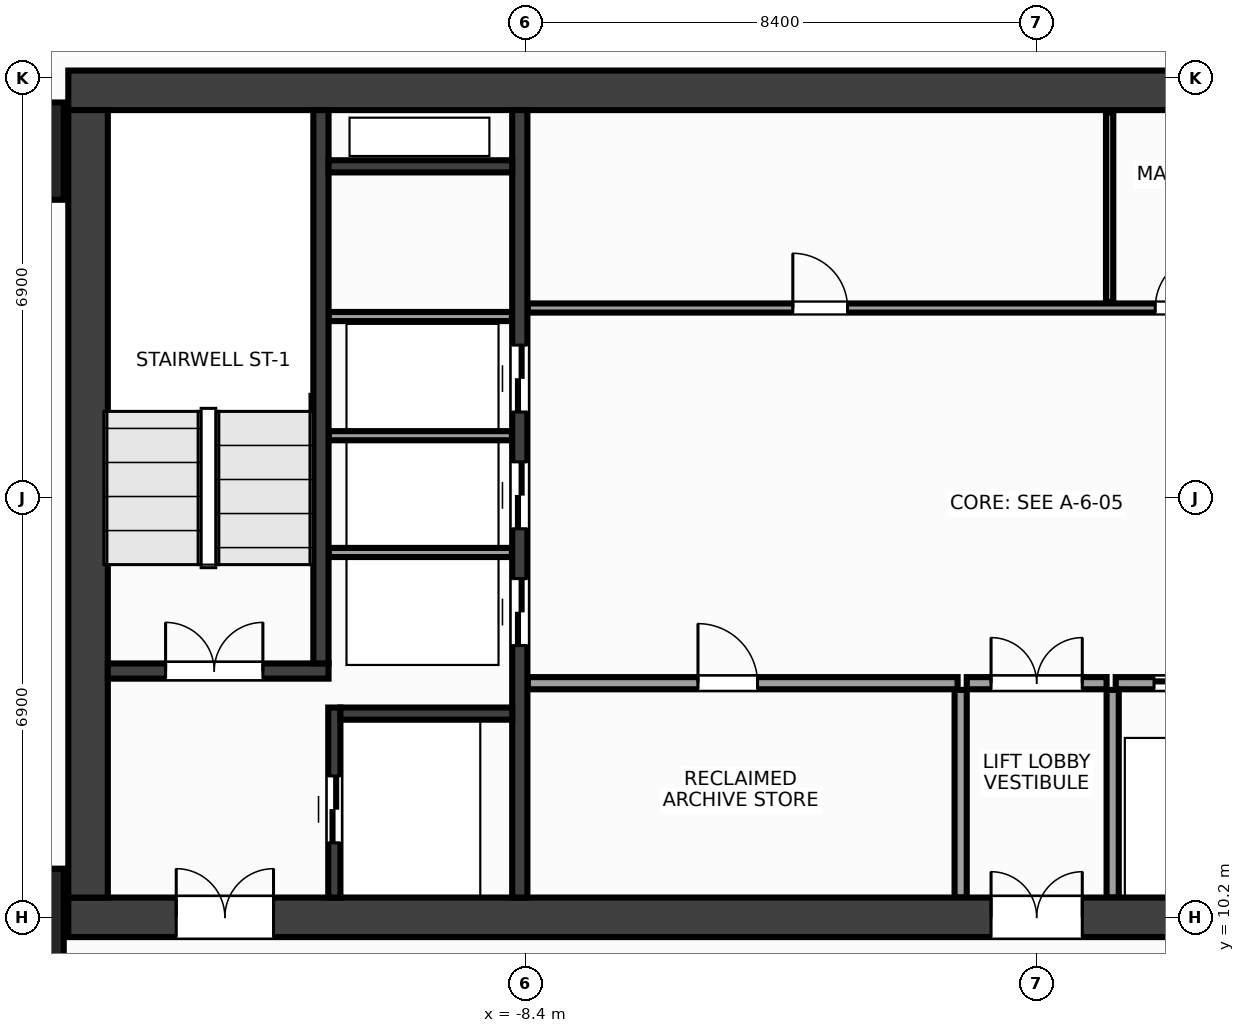
"""IFC4 building model, lengths in metres.
Left out: names, types, materials, properties, quantities, classifications, styles, units other than length and angle.
Written with IfcOpenShell. Run it as: python <this file> out.ifc"""

import sys

from ifc_helpers import new_model, si_unit, direction, frame, frame_2d, origin, origin_2d, place, context, subcontext, project, spatial, rectangle, extrude, source, transform, mapped, element, fill, save


model = new_model("IFC4")
c1 = context("Model", 3, precision=1e-05, world=origin(), true_north=direction((0.0, 1.0)))
c2 = subcontext(c1, "Body", "Model", "MODEL_VIEW")
j1 = project(units=[si_unit("LENGTHUNIT", "METRE"), si_unit("PLANEANGLEUNIT", "RADIAN")], contexts=[c1])
p1 = place(None, origin())
s1 = spatial("IfcSite", under=j1, at=p1, CompositionType="ELEMENT")
p2 = place(p1, origin())
s2 = spatial("IfcBuilding", under=s1, at=p2, CompositionType="ELEMENT")
p3 = place(p2, frame((0.0, 0.0, 167.6)))
s3 = spatial("IfcBuildingStorey", under=s2, at=p3, CompositionType="ELEMENT", Elevation=167.6)
m1 = source(origin(), c2, "Body", "SweptSolid", [
    extrude(rectangle(XDim=31.85, YDim=0.65, at=frame_2d((15.925, 0.0))), origin(), (0.0, 0.0, 1.0), 3.6),
])
p4 = place(p3, frame((-15.925, 23.8, 0.0), z_axis=(0.0, 0.0, 1.0), x_axis=(1.0, 0.0, 0.0)))
e1 = element("IfcWall", 1, at=p4, inside=s3, PredefinedType="SHEAR", context=c2, shape_type="MappedRepresentation", body=[
    mapped(m1, transform((0.0, 0.0, 0.0), x_axis=(1.0, 0.0, 0.0), y_axis=(0.0, 1.0, 0.0), z_axis=(0.0, 0.0, 1.0), scale=1.0)),
])
p5 = place(p3, frame((-15.925, 10.2, 0.0), z_axis=(0.0, 0.0, 1.0), x_axis=(1.0, 0.0, 0.0)))
e2 = element("IfcWall", 2, at=p5, inside=s3, PredefinedType="SHEAR", context=c2, shape_type="MappedRepresentation", body=[
    mapped(m1, transform((0.0, 0.0, 0.0), x_axis=(1.0, 0.0, 0.0), y_axis=(0.0, 1.0, 0.0), z_axis=(0.0, 0.0, 1.0), scale=1.0)),
])
p6 = place(p5, frame((1.775, 0.0, 0.0)))
e3 = element("IfcOpeningElement", 3, at=p6, cuts=e2, PredefinedType="OPENING", context=c2, shape_type="SweptSolid", body=[
    extrude(rectangle(XDim=1.6, YDim=2.15, at=frame_2d((0.8, 1.075))), frame((0.0, 0.337, 0.0), z_axis=(0.0, -1.0, 0.0), x_axis=(1.0, 0.0, 0.0)), (0.0, 0.0, 1.0), 0.674),
])
p7 = place(p5, frame((28.475, 0.0, 0.0)))
e4 = element("IfcOpeningElement", 4, at=p7, cuts=e2, PredefinedType="OPENING", context=c2, shape_type="SweptSolid", body=[
    extrude(rectangle(XDim=1.6, YDim=2.15, at=frame_2d((0.8, 1.075))), frame((0.0, 0.337, 0.0), z_axis=(0.0, -1.0, 0.0), x_axis=(1.0, 0.0, 0.0)), (0.0, 0.0, 1.0), 0.674),
])
p8 = place(p5, frame((15.175, 0.0, 0.0)))
e5 = element("IfcOpeningElement", 5, at=p8, cuts=e2, PredefinedType="OPENING", context=c2, shape_type="SweptSolid", body=[
    extrude(rectangle(XDim=1.5, YDim=2.2, at=frame_2d((0.75, 1.1))), frame((0.0, 0.337, 0.0), z_axis=(0.0, -1.0, 0.0), x_axis=(1.0, 0.0, 0.0)), (0.0, 0.0, 1.0), 0.674),
])
m2 = source(origin(), c2, "Body", "SweptSolid", [
    extrude(rectangle(XDim=12.95, YDim=0.65, at=frame_2d((6.475, 0.0))), origin(), (0.0, 0.0, 1.0), 3.6),
])
p9 = place(p3, frame((-15.6, 10.525, 0.0), z_axis=(0.0, 0.0, 1.0), x_axis=(0.0, 1.0, 0.0)))
e6 = element("IfcWall", 6, at=p9, inside=s3, PredefinedType="SHEAR", context=c2, shape_type="MappedRepresentation", body=[
    mapped(m2, transform((0.0, 0.0, 0.0), x_axis=(1.0, 0.0, 0.0), y_axis=(0.0, 1.0, 0.0), z_axis=(0.0, 0.0, 1.0), scale=1.0)),
])
m3 = source(origin(), c2, "Body", "SweptSolid", [
    extrude(rectangle(XDim=12.95, YDim=0.25, at=frame_2d((6.475, 0.0))), origin(), (0.0, 0.0, 1.0), 3.6),
])
p10 = place(p3, frame((-8.5, 10.525, 0.0), z_axis=(0.0, 0.0, 1.0), x_axis=(0.0, 1.0, 0.0)))
e7 = element("IfcWall", 7, at=p10, inside=s3, PredefinedType="SHEAR", context=c2, shape_type="MappedRepresentation", body=[
    mapped(m3, transform((0.0, 0.0, 0.0), x_axis=(1.0, 0.0, 0.0), y_axis=(0.0, 1.0, 0.0), z_axis=(0.0, 0.0, 1.0), scale=1.0)),
])
p11 = place(p10, frame((4.145, 0.0, 0.0)))
e8 = element("IfcOpeningElement", 8, at=p11, cuts=e7, PredefinedType="OPENING", context=c2, shape_type="SweptSolid", body=[
    extrude(rectangle(XDim=1.1, YDim=2.15, at=frame_2d((0.55, 1.075))), frame((0.0, 0.137, 0.0), z_axis=(0.0, -1.0, 0.0), x_axis=(1.0, 0.0, 0.0)), (0.0, 0.0, 1.0), 0.274),
])
p12 = place(p10, frame((6.065, 0.0, 0.0)))
e9 = element("IfcOpeningElement", 9, at=p12, cuts=e7, PredefinedType="OPENING", context=c2, shape_type="SweptSolid", body=[
    extrude(rectangle(XDim=1.1, YDim=2.15, at=frame_2d((0.55, 1.075))), frame((0.0, 0.137, 0.0), z_axis=(0.0, -1.0, 0.0), x_axis=(1.0, 0.0, 0.0)), (0.0, 0.0, 1.0), 0.274),
])
p13 = place(p10, frame((7.985, 0.0, 0.0)))
e10 = element("IfcOpeningElement", 10, at=p13, cuts=e7, PredefinedType="OPENING", context=c2, shape_type="SweptSolid", body=[
    extrude(rectangle(XDim=1.1, YDim=2.15, at=frame_2d((0.55, 1.075))), frame((0.0, 0.137, 0.0), z_axis=(0.0, -1.0, 0.0), x_axis=(1.0, 0.0, 0.0)), (0.0, 0.0, 1.0), 0.274),
])
m4 = source(origin(), c2, "Body", "SweptSolid", [
    extrude(rectangle(XDim=3.63, YDim=0.25, at=frame_2d((1.815, 0.0))), origin(), (0.0, 0.0, 1.0), 3.6),
])
p14 = place(p3, frame((-15.275, 14.25, 0.0), z_axis=(0.0, 0.0, 1.0), x_axis=(1.0, 0.0, 0.0)))
e11 = element("IfcWall", 11, at=p14, inside=s3, PredefinedType="SHEAR", context=c2, shape_type="MappedRepresentation", body=[
    mapped(m4, transform((0.0, 0.0, 0.0), x_axis=(1.0, 0.0, 0.0), y_axis=(0.0, 1.0, 0.0), z_axis=(0.0, 0.0, 1.0), scale=1.0)),
])
p15 = place(p14, frame((0.95, 0.0, 0.0)))
e12 = element("IfcOpeningElement", 12, at=p15, cuts=e11, PredefinedType="OPENING", context=c2, shape_type="SweptSolid", body=[
    extrude(rectangle(XDim=1.6, YDim=2.15, at=frame_2d((0.8, 1.075))), frame((0.0, 0.137, 0.0), z_axis=(0.0, -1.0, 0.0), x_axis=(1.0, 0.0, 0.0)), (0.0, 0.0, 1.0), 0.274),
])
m5 = source(origin(), c2, "Body", "SweptSolid", [
    extrude(rectangle(XDim=9.1, YDim=0.25, at=frame_2d((4.55, 0.0))), origin(), (0.0, 0.0, 1.0), 3.6),
])
p16 = place(p3, frame((-11.77, 14.375, 0.0), z_axis=(0.0, 0.0, 1.0), x_axis=(0.0, 1.0, 0.0)))
e13 = element("IfcWall", 13, at=p16, inside=s3, PredefinedType="SHEAR", context=c2, shape_type="MappedRepresentation", body=[
    mapped(m5, transform((0.0, 0.0, 0.0), x_axis=(1.0, 0.0, 0.0), y_axis=(0.0, 1.0, 0.0), z_axis=(0.0, 0.0, 1.0), scale=1.0)),
])
m6 = source(origin(), c2, "Body", "SweptSolid", [
    extrude(rectangle(XDim=3.125, YDim=0.2, at=frame_2d((1.562, 0.0))), origin(), (0.0, 0.0, 1.0), 3.6),
])
p17 = place(p3, frame((-11.55, 10.525, 0.0), z_axis=(0.0, 0.0, 1.0), x_axis=(0.0, 1.0, 0.0)))
e14 = element("IfcWall", 14, at=p17, inside=s3, PredefinedType="SHEAR", context=c2, shape_type="MappedRepresentation", body=[
    mapped(m6, transform((0.0, 0.0, 0.0), x_axis=(1.0, 0.0, 0.0), y_axis=(0.0, 1.0, 0.0), z_axis=(0.0, 0.0, 1.0), scale=1.0)),
])
p18 = place(p17, frame((0.9, 0.0, 0.0)))
e15 = element("IfcOpeningElement", 15, at=p18, cuts=e14, PredefinedType="OPENING", context=c2, shape_type="SweptSolid", body=[
    extrude(rectangle(XDim=1.1, YDim=2.15, at=frame_2d((0.55, 1.075))), frame((0.0, 0.112, 0.0), z_axis=(0.0, -1.0, 0.0), x_axis=(1.0, 0.0, 0.0)), (0.0, 0.0, 1.0), 0.224),
])
m7 = source(origin(), c2, "Body", "SweptSolid", [
    extrude(rectangle(XDim=2.825, YDim=0.2, at=frame_2d((1.413, 0.0))), origin(), (0.0, 0.0, 1.0), 3.6),
])
p19 = place(p3, frame((-11.45, 13.55, 0.0), z_axis=(0.0, 0.0, 1.0), x_axis=(1.0, 0.0, 0.0)))
e16 = element("IfcWall", 16, at=p19, inside=s3, PredefinedType="SHEAR", context=c2, shape_type="MappedRepresentation", body=[
    mapped(m7, transform((0.0, 0.0, 0.0), x_axis=(1.0, 0.0, 0.0), y_axis=(0.0, 1.0, 0.0), z_axis=(0.0, 0.0, 1.0), scale=1.0)),
])
m8 = source(origin(), c2, "Body", "SweptSolid", [
    extrude(rectangle(XDim=3.02, YDim=0.2, at=frame_2d((1.51, 0.0))), origin(), (0.0, 0.0, 1.0), 3.6),
])
p20 = place(p3, frame((-11.645, 22.55, 0.0), z_axis=(0.0, 0.0, 1.0), x_axis=(1.0, 0.0, 0.0)))
e17 = element("IfcWall", 17, at=p20, inside=s3, PredefinedType="SHEAR", context=c2, shape_type="MappedRepresentation", body=[
    mapped(m8, transform((0.0, 0.0, 0.0), x_axis=(1.0, 0.0, 0.0), y_axis=(0.0, 1.0, 0.0), z_axis=(0.0, 0.0, 1.0), scale=1.0)),
])
m9 = source(origin(), c2, "Body", "SweptSolid", [
    extrude(rectangle(XDim=1.6, YDim=1.6, at=origin_2d()), origin(), (0.0, 0.0, 1.0), 3.6),
])
for number, where, z_axis, x_axis in (
    (18, (-16.8, 10.2, 0.0), (0.0, 0.0, 1.0), (1.0, 0.0, 0.0)),
    (19, (-16.8, 22.8, 0.0), (0.0, 0.0, 1.0), (1.0, 0.0, 0.0)),
):
    element("IfcColumn", number, at=place(p3, frame(where, z_axis=z_axis, x_axis=x_axis)), inside=s3, PredefinedType="COLUMN", context=c2, shape_type="MappedRepresentation", body=[
        mapped(m9, transform((0.0, 0.0, 0.0), x_axis=(1.0, 0.0, 0.0), y_axis=(0.0, 1.0, 0.0), z_axis=(0.0, 0.0, 1.0), scale=1.0)),
    ])
m10 = source(origin(), c2, "Body", "SweptSolid", [
    extrude(rectangle(XDim=3.01, YDim=0.15, at=frame_2d((1.505, 0.0))), origin(), (0.0, 0.0, 1.0), 3.38),
])
for number, where, z_axis, x_axis in (
    (20, (-11.64, 16.2, 0.0), (0.0, 0.0, 1.0), (1.0, 0.0, 0.0)),
    (21, (-11.64, 18.12, 0.0), (0.0, 0.0, 1.0), (1.0, 0.0, 0.0)),
    (22, (-11.64, 20.08, 0.0), (0.0, 0.0, 1.0), (1.0, 0.0, 0.0)),
):
    element("IfcWall", number, at=place(p3, frame(where, z_axis=z_axis, x_axis=x_axis)), inside=s3, PredefinedType="PARTITIONING", context=c2, shape_type="MappedRepresentation", body=[
        mapped(m10, transform((0.0, 0.0, 0.0), x_axis=(1.0, 0.0, 0.0), y_axis=(0.0, 1.0, 0.0), z_axis=(0.0, 0.0, 1.0), scale=1.0)),
    ])
m11 = source(origin(), c2, "Body", "SweptSolid", [
    extrude(rectangle(XDim=7.07, YDim=0.2, at=frame_2d((3.535, 0.0))), origin(), (0.0, 0.0, 1.0), 3.38),
])
p21 = place(p3, frame((-8.37, 14.05, 0.0), z_axis=(0.0, 0.0, 1.0), x_axis=(1.0, 0.0, 0.0)))
e23 = element("IfcWall", 23, at=p21, inside=s3, PredefinedType="PARTITIONING", context=c2, shape_type="MappedRepresentation", body=[
    mapped(m11, transform((0.0, 0.0, 0.0), x_axis=(1.0, 0.0, 0.0), y_axis=(0.0, 1.0, 0.0), z_axis=(0.0, 0.0, 1.0), scale=1.0)),
])
p22 = place(p21, frame((2.8, 0.0, 0.0)))
e24 = element("IfcOpeningElement", 24, at=p22, cuts=e23, PredefinedType="OPENING", context=c2, shape_type="SweptSolid", body=[
    extrude(rectangle(XDim=0.98, YDim=2.15, at=frame_2d((0.49, 1.075))), frame((0.0, 0.112, 0.0), z_axis=(0.0, -1.0, 0.0), x_axis=(1.0, 0.0, 0.0)), (0.0, 0.0, 1.0), 0.224),
])
p23 = place(p3, frame((1.3, 14.05, 0.0), z_axis=(0.0, 0.0, 1.0), x_axis=(1.0, 0.0, 0.0)))
e25 = element("IfcWall", 25, at=p23, inside=s3, PredefinedType="PARTITIONING", context=c2, shape_type="MappedRepresentation", body=[
    mapped(m11, transform((0.0, 0.0, 0.0), x_axis=(1.0, 0.0, 0.0), y_axis=(0.0, 1.0, 0.0), z_axis=(0.0, 0.0, 1.0), scale=1.0)),
])
p24 = place(p23, frame((0.63, 0.0, 0.0)))
e26 = element("IfcOpeningElement", 26, at=p24, cuts=e25, PredefinedType="OPENING", context=c2, shape_type="SweptSolid", body=[
    extrude(rectangle(XDim=1.1, YDim=2.15, at=frame_2d((0.55, 1.075))), frame((0.0, 0.112, 0.0), z_axis=(0.0, -1.0, 0.0), x_axis=(1.0, 0.0, 0.0)), (0.0, 0.0, 1.0), 0.224),
])
p25 = place(p23, frame((2.98, 0.0, 0.0)))
e27 = element("IfcOpeningElement", 27, at=p25, cuts=e25, PredefinedType="OPENING", context=c2, shape_type="SweptSolid", body=[
    extrude(rectangle(XDim=1.1, YDim=2.15, at=frame_2d((0.55, 1.075))), frame((0.0, 0.112, 0.0), z_axis=(0.0, -1.0, 0.0), x_axis=(1.0, 0.0, 0.0)), (0.0, 0.0, 1.0), 0.224),
])
p26 = place(p23, frame((5.33, 0.0, 0.0)))
e28 = element("IfcOpeningElement", 28, at=p26, cuts=e25, PredefinedType="OPENING", context=c2, shape_type="SweptSolid", body=[
    extrude(rectangle(XDim=1.1, YDim=2.15, at=frame_2d((0.55, 1.075))), frame((0.0, 0.112, 0.0), z_axis=(0.0, -1.0, 0.0), x_axis=(1.0, 0.0, 0.0)), (0.0, 0.0, 1.0), 0.224),
])
m12 = source(origin(), c2, "Body", "SweptSolid", [
    extrude(rectangle(XDim=3.415, YDim=0.2, at=frame_2d((1.708, 0.0))), origin(), (0.0, 0.0, 1.0), 3.38),
])
for number, where, z_axis, x_axis in (
    (29, (-1.25, 10.525, 0.0), (0.0, 0.0, 1.0), (0.0, 1.0, 0.0)),
    (30, (1.25, 10.525, 0.0), (0.0, 0.0, 1.0), (0.0, 1.0, 0.0)),
):
    element("IfcWall", number, at=place(p3, frame(where, z_axis=z_axis, x_axis=x_axis)), inside=s3, PredefinedType="PARTITIONING", context=c2, shape_type="MappedRepresentation", body=[
        mapped(m12, transform((0.0, 0.0, 0.0), x_axis=(1.0, 0.0, 0.0), y_axis=(0.0, 1.0, 0.0), z_axis=(0.0, 0.0, 1.0), scale=1.0)),
    ])
m13 = source(origin(), c2, "Body", "SweptSolid", [
    extrude(rectangle(XDim=2.3, YDim=0.2, at=frame_2d((1.15, 0.0))), origin(), (0.0, 0.0, 1.0), 3.38),
])
p27 = place(p3, frame((-1.15, 14.05, 0.0), z_axis=(0.0, 0.0, 1.0), x_axis=(1.0, 0.0, 0.0)))
e31 = element("IfcWall", 31, at=p27, inside=s3, PredefinedType="PARTITIONING", context=c2, shape_type="MappedRepresentation", body=[
    mapped(m13, transform((0.0, 0.0, 0.0), x_axis=(1.0, 0.0, 0.0), y_axis=(0.0, 1.0, 0.0), z_axis=(0.0, 0.0, 1.0), scale=1.0)),
])
p28 = place(p27, frame((0.4, 0.0, 0.0)))
e32 = element("IfcOpeningElement", 32, at=p28, cuts=e31, PredefinedType="OPENING", context=c2, shape_type="SweptSolid", body=[
    extrude(rectangle(XDim=1.5, YDim=2.2, at=frame_2d((0.75, 1.1))), frame((0.0, 0.112, 0.0), z_axis=(0.0, -1.0, 0.0), x_axis=(1.0, 0.0, 0.0)), (0.0, 0.0, 1.0), 0.224),
])
m14 = source(origin(), c2, "Body", "SweptSolid", [
    extrude(rectangle(XDim=14.59, YDim=0.15, at=frame_2d((7.295, 0.0))), origin(), (0.0, 0.0, 1.0), 3.38),
])
p29 = place(p3, frame((-8.37, 20.22, 0.0), z_axis=(0.0, 0.0, 1.0), x_axis=(1.0, 0.0, 0.0)))
e33 = element("IfcWall", 33, at=p29, inside=s3, PredefinedType="PARTITIONING", context=c2, shape_type="MappedRepresentation", body=[
    mapped(m14, transform((0.0, 0.0, 0.0), x_axis=(1.0, 0.0, 0.0), y_axis=(0.0, 1.0, 0.0), z_axis=(0.0, 0.0, 1.0), scale=1.0)),
])
p30 = place(p29, frame((4.36, 0.0, 0.0)))
e34 = element("IfcOpeningElement", 34, at=p30, cuts=e33, PredefinedType="OPENING", context=c2, shape_type="SweptSolid", body=[
    extrude(rectangle(XDim=0.9, YDim=2.15, at=frame_2d((0.45, 1.075))), frame((0.0, 0.087, 0.0), z_axis=(0.0, -1.0, 0.0), x_axis=(1.0, 0.0, 0.0)), (0.0, 0.0, 1.0), 0.174),
])
p31 = place(p29, frame((10.32, 0.0, 0.0)))
e35 = element("IfcOpeningElement", 35, at=p31, cuts=e33, PredefinedType="OPENING", context=c2, shape_type="SweptSolid", body=[
    extrude(rectangle(XDim=0.9, YDim=2.15, at=frame_2d((0.45, 1.075))), frame((0.0, 0.087, 0.0), z_axis=(0.0, -1.0, 0.0), x_axis=(1.0, 0.0, 0.0)), (0.0, 0.0, 1.0), 0.174),
])
p32 = place(p29, frame((12.77, 0.0, 0.0)))
e36 = element("IfcOpeningElement", 36, at=p32, cuts=e33, PredefinedType="OPENING", context=c2, shape_type="SweptSolid", body=[
    extrude(rectangle(XDim=0.9, YDim=2.15, at=frame_2d((0.45, 1.075))), frame((0.0, 0.087, 0.0), z_axis=(0.0, -1.0, 0.0), x_axis=(1.0, 0.0, 0.0)), (0.0, 0.0, 1.0), 0.174),
])
m15 = source(origin(), c2, "Body", "SweptSolid", [
    extrude(rectangle(XDim=3.115, YDim=0.12, at=frame_2d((1.558, 0.0))), origin(), (0.0, 0.0, 1.0), 3.38),
])
p33 = place(p3, frame((1.2, 20.32, 0.0), z_axis=(0.0, 0.0, 1.0), x_axis=(0.0, 1.0, 0.0)))
e37 = element("IfcWall", 37, at=p33, inside=s3, PredefinedType="PARTITIONING", context=c2, shape_type="MappedRepresentation", body=[
    mapped(m15, transform((0.0, 0.0, 0.0), x_axis=(1.0, 0.0, 0.0), y_axis=(0.0, 1.0, 0.0), z_axis=(0.0, 0.0, 1.0), scale=1.0)),
])
m16 = source(origin(), c2, "Body", "SweptSolid", [
    extrude(rectangle(XDim=1.6, YDim=2.15, at=frame_2d((0.8, 1.075))), frame((0.0, 0.025, 0.0), z_axis=(0.0, -1.0, 0.0), x_axis=(1.0, 0.0, 0.0)), (0.0, 0.0, 1.0), 0.05),
])
p34 = place(p15, origin())
e38 = element("IfcDoor", 38, at=p34, inside=s3, OperationType="DOUBLE_DOOR_SINGLE_SWING", PredefinedType="DOOR", context=c2, shape_type="MappedRepresentation", body=[
    mapped(m16, transform((0.0, 0.0, 0.0), x_axis=(1.0, 0.0, 0.0), y_axis=(0.0, 1.0, 0.0), z_axis=(0.0, 0.0, 1.0), scale=1.0)),
])
fill(e12, e38)
p35 = place(p6, origin())
e39 = element("IfcDoor", 39, at=p35, inside=s3, OperationType="DOUBLE_DOOR_SINGLE_SWING", PredefinedType="DOOR", context=c2, shape_type="MappedRepresentation", body=[
    mapped(m16, transform((0.0, 0.0, 0.0), x_axis=(1.0, 0.0, 0.0), y_axis=(0.0, 1.0, 0.0), z_axis=(0.0, 0.0, 1.0), scale=1.0)),
])
fill(e3, e39)
m17 = source(origin(), c2, "Body", "SweptSolid", [
    extrude(rectangle(XDim=1.1, YDim=2.15, at=frame_2d((0.55, 1.075))), frame((0.0, 0.025, 0.0), z_axis=(0.0, -1.0, 0.0), x_axis=(1.0, 0.0, 0.0)), (0.0, 0.0, 1.0), 0.05),
])
p36 = place(p18, origin())
e40 = element("IfcDoor", 40, at=p36, inside=s3, OperationType="DOUBLE_DOOR_SLIDING", PredefinedType="DOOR", context=c2, shape_type="MappedRepresentation", body=[
    mapped(m17, transform((0.0, 0.0, 0.0), x_axis=(1.0, 0.0, 0.0), y_axis=(0.0, 1.0, 0.0), z_axis=(0.0, 0.0, 1.0), scale=1.0)),
])
fill(e15, e40)
p37 = place(p11, origin())
e41 = element("IfcDoor", 41, at=p37, inside=s3, OperationType="DOUBLE_DOOR_SLIDING", PredefinedType="DOOR", context=c2, shape_type="MappedRepresentation", body=[
    mapped(m17, transform((0.0, 0.0, 0.0), x_axis=(1.0, 0.0, 0.0), y_axis=(0.0, 1.0, 0.0), z_axis=(0.0, 0.0, 1.0), scale=1.0)),
])
fill(e8, e41)
p38 = place(p12, origin())
e42 = element("IfcDoor", 42, at=p38, inside=s3, OperationType="DOUBLE_DOOR_SLIDING", PredefinedType="DOOR", context=c2, shape_type="MappedRepresentation", body=[
    mapped(m17, transform((0.0, 0.0, 0.0), x_axis=(1.0, 0.0, 0.0), y_axis=(0.0, 1.0, 0.0), z_axis=(0.0, 0.0, 1.0), scale=1.0)),
])
fill(e9, e42)
p39 = place(p13, origin())
e43 = element("IfcDoor", 43, at=p39, inside=s3, OperationType="DOUBLE_DOOR_SLIDING", PredefinedType="DOOR", context=c2, shape_type="MappedRepresentation", body=[
    mapped(m17, transform((0.0, 0.0, 0.0), x_axis=(1.0, 0.0, 0.0), y_axis=(0.0, 1.0, 0.0), z_axis=(0.0, 0.0, 1.0), scale=1.0)),
])
fill(e10, e43)
m18 = source(origin(), c2, "Body", "SweptSolid", [
    extrude(rectangle(XDim=0.98, YDim=2.15, at=frame_2d((0.49, 1.075))), frame((0.0, 0.025, 0.0), z_axis=(0.0, -1.0, 0.0), x_axis=(1.0, 0.0, 0.0)), (0.0, 0.0, 1.0), 0.05),
])
p40 = place(p22, origin())
e44 = element("IfcDoor", 44, at=p40, inside=s3, OperationType="SINGLE_SWING_LEFT", PredefinedType="DOOR", context=c2, shape_type="MappedRepresentation", body=[
    mapped(m18, transform((0.0, 0.0, 0.0), x_axis=(1.0, 0.0, 0.0), y_axis=(0.0, 1.0, 0.0), z_axis=(0.0, 0.0, 1.0), scale=1.0)),
])
fill(e24, e44)
p41 = place(p24, origin())
e45 = element("IfcDoor", 45, at=p41, inside=s3, OperationType="DOUBLE_DOOR_SLIDING", PredefinedType="DOOR", context=c2, shape_type="MappedRepresentation", body=[
    mapped(m17, transform((0.0, 0.0, 0.0), x_axis=(1.0, 0.0, 0.0), y_axis=(0.0, 1.0, 0.0), z_axis=(0.0, 0.0, 1.0), scale=1.0)),
])
fill(e26, e45)
m19 = source(origin(), c2, "Body", "SweptSolid", [
    extrude(rectangle(XDim=1.5, YDim=2.2, at=frame_2d((0.75, 1.1))), frame((0.0, 0.025, 0.0), z_axis=(0.0, -1.0, 0.0), x_axis=(1.0, 0.0, 0.0)), (0.0, 0.0, 1.0), 0.05),
])
p42 = place(p28, origin())
e46 = element("IfcDoor", 46, at=p42, inside=s3, OperationType="DOUBLE_DOOR_SINGLE_SWING", PredefinedType="DOOR", context=c2, shape_type="MappedRepresentation", body=[
    mapped(m19, transform((0.0, 0.0, 0.0), x_axis=(1.0, 0.0, 0.0), y_axis=(0.0, 1.0, 0.0), z_axis=(0.0, 0.0, 1.0), scale=1.0)),
])
fill(e32, e46)
p43 = place(p8, origin())
e47 = element("IfcDoor", 47, at=p43, inside=s3, OperationType="DOUBLE_DOOR_SINGLE_SWING", PredefinedType="DOOR", context=c2, shape_type="MappedRepresentation", body=[
    mapped(m19, transform((0.0, 0.0, 0.0), x_axis=(1.0, 0.0, 0.0), y_axis=(0.0, 1.0, 0.0), z_axis=(0.0, 0.0, 1.0), scale=1.0)),
])
fill(e5, e47)
m20 = source(origin(), c2, "Body", "SweptSolid", [
    extrude(rectangle(XDim=0.9, YDim=2.15, at=frame_2d((0.45, 1.075))), frame((0.0, 0.025, 0.0), z_axis=(0.0, -1.0, 0.0), x_axis=(1.0, 0.0, 0.0)), (0.0, 0.0, 1.0), 0.05),
])
p44 = place(p30, origin())
e48 = element("IfcDoor", 48, at=p44, inside=s3, OperationType="SINGLE_SWING_LEFT", PredefinedType="DOOR", context=c2, shape_type="MappedRepresentation", body=[
    mapped(m20, transform((0.0, 0.0, 0.0), x_axis=(1.0, 0.0, 0.0), y_axis=(0.0, 1.0, 0.0), z_axis=(0.0, 0.0, 1.0), scale=1.0)),
])
fill(e34, e48)
p45 = place(p31, origin())
e49 = element("IfcDoor", 49, at=p45, inside=s3, OperationType="SINGLE_SWING_RIGHT", PredefinedType="DOOR", context=c2, shape_type="MappedRepresentation", body=[
    mapped(m20, transform((0.0, 0.0, 0.0), x_axis=(1.0, 0.0, 0.0), y_axis=(0.0, 1.0, 0.0), z_axis=(0.0, 0.0, 1.0), scale=1.0)),
])
fill(e35, e49)
save(model, sys.argv[1])
